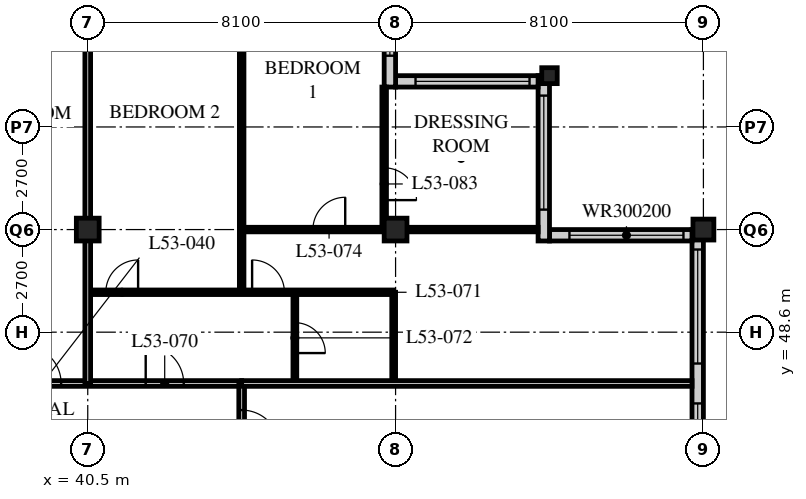
"""IFC4 building model, lengths in metres.
Left out: names, types, materials, properties, quantities, classifications, styles, units other than length and angle.
Written with IfcOpenShell. Run it as: python <this file> out.ifc"""

import sys

from ifc_helpers import new_model, si_unit, direction, frame, frame_2d, origin, origin_2d, place, context, subcontext, project, spatial, rectangle, hollow_rectangle, i_section, extrude, element, fill, save


model = new_model("IFC4")
c1 = context("Model", 3, precision=1e-05, world=origin(), true_north=direction((0.0, 1.0)))
c2 = subcontext(c1, "Body", "Model", "MODEL_VIEW")
j1 = project(units=[si_unit("LENGTHUNIT", "METRE"), si_unit("PLANEANGLEUNIT", "RADIAN")], contexts=[c1])
p1 = place(None, origin())
s1 = spatial("IfcSite", under=j1, at=p1, CompositionType="ELEMENT")
p2 = place(p1, origin())
s2 = spatial("IfcBuilding", under=s1, at=p2, CompositionType="ELEMENT")
p3 = place(p2, frame((0.0, 0.0, 206.4)))
s3 = spatial("IfcBuildingStorey", under=s2, at=p3, CompositionType="ELEMENT", Elevation=206.4)
for number, where, z_axis, x_axis in (
    (1, (40.5, 51.3, 0.0), (0.0, 0.0, 1.0), (1.0, 0.0, 0.0)),
    (2, (48.6, 51.3, 0.0), (0.0, 0.0, 1.0), (1.0, 0.0, 0.0)),
):
    element("IfcColumn", number, at=place(p3, frame(where, z_axis=z_axis, x_axis=x_axis)), inside=s3, PredefinedType="COLUMN", context=c2, shape_type="SweptSolid", body=[
        extrude(hollow_rectangle(XDim=0.6, YDim=0.6, WallThickness=0.05, at=origin_2d()), origin(), (0.0, 0.0, 1.0), 3.6),
    ])
p4 = place(p3, frame((52.65, 55.35, 0.0), z_axis=(0.0, 0.0, 1.0), x_axis=(1.0, 0.0, 0.0)))
e3 = element("IfcColumn", 3, at=p4, inside=s3, PredefinedType="COLUMN", context=c2, shape_type="SweptSolid", body=[
    extrude(i_section(OverallWidth=0.407, OverallDepth=0.419, WebThickness=0.031, FlangeThickness=0.049, FilletRadius=0.015, at=origin_2d()), origin(), (0.0, 0.0, 1.0), 3.6),
])
p5 = place(p3, frame((56.7, 51.3, 0.0), z_axis=(0.0, 0.0, 1.0), x_axis=(1.0, 0.0, 0.0)))
e4 = element("IfcColumn", 4, at=p5, inside=s3, PredefinedType="COLUMN", context=c2, shape_type="SweptSolid", body=[
    extrude(hollow_rectangle(XDim=0.55, YDim=0.55, WallThickness=0.045, at=origin_2d()), origin(), (0.0, 0.0, 1.0), 3.6),
])
p6 = place(p3, frame((56.55, 19.2, 0.0), z_axis=(0.0, 0.0, 1.0), x_axis=(0.0, 1.0, 0.0)))
e5 = element("IfcWall", 5, at=p6, inside=s3, PredefinedType="SOLIDWALL", context=c2, shape_type="SweptSolid", body=[
    extrude(rectangle(XDim=32.1, YDim=0.3, at=frame_2d((16.05, 0.0))), origin(), (0.0, 0.0, 1.0), 3.39),
])
p7 = place(p6, frame((0.225, 0.0, 0.6)))
e6 = element("IfcOpeningElement", 6, at=p7, cuts=e5, PredefinedType="OPENING", context=c2, shape_type="SweptSolid", body=[
    extrude(rectangle(XDim=3.0, YDim=2.4, at=frame_2d((1.5, 1.2))), frame((0.0, 0.16, 0.0), z_axis=(0.0, -1.0, 0.0), x_axis=(1.0, 0.0, 0.0)), (0.0, 0.0, 1.0), 0.32),
])
p8 = place(p6, frame((4.275, 0.0, 0.6)))
e7 = element("IfcOpeningElement", 7, at=p8, cuts=e5, PredefinedType="OPENING", context=c2, shape_type="SweptSolid", body=[
    extrude(rectangle(XDim=3.0, YDim=2.4, at=frame_2d((1.5, 1.2))), frame((0.0, 0.16, 0.0), z_axis=(0.0, -1.0, 0.0), x_axis=(1.0, 0.0, 0.0)), (0.0, 0.0, 1.0), 0.32),
])
p9 = place(p6, frame((8.325, 0.0, 0.6)))
e8 = element("IfcOpeningElement", 8, at=p9, cuts=e5, PredefinedType="OPENING", context=c2, shape_type="SweptSolid", body=[
    extrude(rectangle(XDim=3.0, YDim=2.4, at=frame_2d((1.5, 1.2))), frame((0.0, 0.16, 0.0), z_axis=(0.0, -1.0, 0.0), x_axis=(1.0, 0.0, 0.0)), (0.0, 0.0, 1.0), 0.32),
])
p10 = place(p6, frame((12.375, 0.0, 0.6)))
e9 = element("IfcOpeningElement", 9, at=p10, cuts=e5, PredefinedType="OPENING", context=c2, shape_type="SweptSolid", body=[
    extrude(rectangle(XDim=3.0, YDim=2.4, at=frame_2d((1.5, 1.2))), frame((0.0, 0.16, 0.0), z_axis=(0.0, -1.0, 0.0), x_axis=(1.0, 0.0, 0.0)), (0.0, 0.0, 1.0), 0.32),
])
p11 = place(p6, frame((16.425, 0.0, 0.6)))
e10 = element("IfcOpeningElement", 10, at=p11, cuts=e5, PredefinedType="OPENING", context=c2, shape_type="SweptSolid", body=[
    extrude(rectangle(XDim=3.0, YDim=2.4, at=frame_2d((1.5, 1.2))), frame((0.0, 0.16, 0.0), z_axis=(0.0, -1.0, 0.0), x_axis=(1.0, 0.0, 0.0)), (0.0, 0.0, 1.0), 0.32),
])
p12 = place(p6, frame((20.475, 0.0, 0.6)))
e11 = element("IfcOpeningElement", 11, at=p12, cuts=e5, PredefinedType="OPENING", context=c2, shape_type="SweptSolid", body=[
    extrude(rectangle(XDim=3.0, YDim=2.4, at=frame_2d((1.5, 1.2))), frame((0.0, 0.16, 0.0), z_axis=(0.0, -1.0, 0.0), x_axis=(1.0, 0.0, 0.0)), (0.0, 0.0, 1.0), 0.32),
])
p13 = place(p6, frame((24.525, 0.0, 0.6)))
e12 = element("IfcOpeningElement", 12, at=p13, cuts=e5, PredefinedType="OPENING", context=c2, shape_type="SweptSolid", body=[
    extrude(rectangle(XDim=3.0, YDim=2.4, at=frame_2d((1.5, 1.2))), frame((0.0, 0.16, 0.0), z_axis=(0.0, -1.0, 0.0), x_axis=(1.0, 0.0, 0.0)), (0.0, 0.0, 1.0), 0.32),
])
p14 = place(p6, frame((28.575, 0.0, 0.6)))
e13 = element("IfcOpeningElement", 13, at=p14, cuts=e5, PredefinedType="OPENING", context=c2, shape_type="SweptSolid", body=[
    extrude(rectangle(XDim=3.0, YDim=2.4, at=frame_2d((1.5, 1.2))), frame((0.0, 0.16, 0.0), z_axis=(0.0, -1.0, 0.0), x_axis=(1.0, 0.0, 0.0)), (0.0, 0.0, 1.0), 0.32),
])
p15 = place(p3, frame((56.4, 51.15, 0.0), z_axis=(0.0, 0.0, 1.0), x_axis=(-1.0, 0.0, 0.0)))
e14 = element("IfcWall", 14, at=p15, inside=s3, PredefinedType="SOLIDWALL", context=c2, shape_type="SweptSolid", body=[
    extrude(rectangle(XDim=3.75, YDim=0.3, at=frame_2d((1.875, 0.0))), origin(), (0.0, 0.0, 1.0), 3.39),
])
p16 = place(p15, frame((0.225, 0.0, 0.6)))
e15 = element("IfcOpeningElement", 15, at=p16, cuts=e14, PredefinedType="OPENING", context=c2, shape_type="SweptSolid", body=[
    extrude(rectangle(XDim=3.0, YDim=2.0, at=frame_2d((1.5, 1.0))), frame((0.0, 0.16, 0.0), z_axis=(0.0, -1.0, 0.0), x_axis=(1.0, 0.0, 0.0)), (0.0, 0.0, 1.0), 0.32),
])
p17 = place(p3, frame((52.5, 51.0, 0.0), z_axis=(0.0, 0.0, 1.0), x_axis=(0.0, 1.0, 0.0)))
e16 = element("IfcWall", 16, at=p17, inside=s3, PredefinedType="SOLIDWALL", context=c2, shape_type="SweptSolid", body=[
    extrude(rectangle(XDim=4.35, YDim=0.3, at=frame_2d((2.175, 0.0))), origin(), (0.0, 0.0, 1.0), 3.39),
])
p18 = place(p17, frame((0.825, 0.0, 0.6)))
e17 = element("IfcOpeningElement", 17, at=p18, cuts=e16, PredefinedType="OPENING", context=c2, shape_type="SweptSolid", body=[
    extrude(rectangle(XDim=3.0, YDim=2.0, at=frame_2d((1.5, 1.0))), frame((0.0, 0.16, 0.0), z_axis=(0.0, -1.0, 0.0), x_axis=(1.0, 0.0, 0.0)), (0.0, 0.0, 1.0), 0.32),
])
p19 = place(p3, frame((52.35, 55.2, 0.0), z_axis=(0.0, 0.0, 1.0), x_axis=(-1.0, 0.0, 0.0)))
e18 = element("IfcWall", 18, at=p19, inside=s3, PredefinedType="SOLIDWALL", context=c2, shape_type="SweptSolid", body=[
    extrude(rectangle(XDim=3.75, YDim=0.3, at=frame_2d((1.875, 0.0))), origin(), (0.0, 0.0, 1.0), 3.39),
])
p20 = place(p19, frame((0.225, 0.0, 0.6)))
e19 = element("IfcOpeningElement", 19, at=p20, cuts=e18, PredefinedType="OPENING", context=c2, shape_type="SweptSolid", body=[
    extrude(rectangle(XDim=3.0, YDim=2.0, at=frame_2d((1.5, 1.0))), frame((0.0, 0.16, 0.0), z_axis=(0.0, -1.0, 0.0), x_axis=(1.0, 0.0, 0.0)), (0.0, 0.0, 1.0), 0.32),
])
p21 = place(p3, frame((48.45, 55.05, 0.0), z_axis=(0.0, 0.0, 1.0), x_axis=(0.0, 1.0, 0.0)))
e20 = element("IfcWall", 20, at=p21, inside=s3, PredefinedType="SOLIDWALL", context=c2, shape_type="SweptSolid", body=[
    extrude(rectangle(XDim=4.35, YDim=0.3, at=frame_2d((2.175, 0.0))), origin(), (0.0, 0.0, 1.0), 3.39),
])
p22 = place(p21, frame((0.825, 0.0, 0.6)))
e21 = element("IfcOpeningElement", 21, at=p22, cuts=e20, PredefinedType="OPENING", context=c2, shape_type="SweptSolid", body=[
    extrude(rectangle(XDim=3.0, YDim=2.0, at=frame_2d((1.5, 1.0))), frame((0.0, 0.16, 0.0), z_axis=(0.0, -1.0, 0.0), x_axis=(1.0, 0.0, 0.0)), (0.0, 0.0, 1.0), 0.32),
])
p23 = place(p3, frame((8.1, 47.25, 0.0), z_axis=(0.0, 0.0, 1.0), x_axis=(1.0, 0.0, 0.0)))
e22 = element("IfcWall", 22, at=p23, inside=s3, PredefinedType="PARTITIONING", context=c2, shape_type="SweptSolid", body=[
    extrude(rectangle(XDim=36.45, YDim=0.15, at=frame_2d((18.225, 0.0))), origin(), (0.0, 0.0, 1.0), 3.39),
])
p24 = place(p23, frame((4.45, 0.0, 0.0)))
e23 = element("IfcOpeningElement", 23, at=p24, cuts=e22, PredefinedType="OPENING", context=c2, shape_type="SweptSolid", body=[
    extrude(rectangle(XDim=1.0, YDim=2.1, at=frame_2d((0.5, 1.05))), frame((0.0, 0.085, 0.0), z_axis=(0.0, -1.0, 0.0), x_axis=(1.0, 0.0, 0.0)), (0.0, 0.0, 1.0), 0.17),
])
p25 = place(p23, frame((12.55, 0.0, 0.0)))
e24 = element("IfcOpeningElement", 24, at=p25, cuts=e22, PredefinedType="OPENING", context=c2, shape_type="SweptSolid", body=[
    extrude(rectangle(XDim=1.0, YDim=2.1, at=frame_2d((0.5, 1.05))), frame((0.0, 0.085, 0.0), z_axis=(0.0, -1.0, 0.0), x_axis=(1.0, 0.0, 0.0)), (0.0, 0.0, 1.0), 0.17),
])
p26 = place(p23, frame((30.7, 0.0, 0.0)))
e25 = element("IfcOpeningElement", 25, at=p26, cuts=e22, PredefinedType="OPENING", context=c2, shape_type="SweptSolid", body=[
    extrude(rectangle(XDim=1.0, YDim=2.1, at=frame_2d((0.5, 1.05))), frame((0.0, 0.085, 0.0), z_axis=(0.0, -1.0, 0.0), x_axis=(1.0, 0.0, 0.0)), (0.0, 0.0, 1.0), 0.17),
])
p27 = place(p23, frame((33.925, 0.0, 0.0)))
e26 = element("IfcOpeningElement", 26, at=p27, cuts=e22, PredefinedType="OPENING", context=c2, shape_type="SweptSolid", body=[
    extrude(rectangle(XDim=1.0, YDim=2.1, at=frame_2d((0.5, 1.05))), frame((0.0, 0.085, 0.0), z_axis=(0.0, -1.0, 0.0), x_axis=(1.0, 0.0, 0.0)), (0.0, 0.0, 1.0), 0.17),
])
p28 = place(p23, frame((1.525, 0.0, 0.0)))
e27 = element("IfcOpeningElement", 27, at=p28, cuts=e22, PredefinedType="OPENING", context=c2, shape_type="SweptSolid", body=[
    extrude(rectangle(XDim=1.0, YDim=2.1, at=frame_2d((0.5, 1.05))), frame((0.0, 0.085, 0.0), z_axis=(0.0, -1.0, 0.0), x_axis=(1.0, 0.0, 0.0)), (0.0, 0.0, 1.0), 0.17),
])
p29 = place(p3, frame((44.55, 18.9, 0.0), z_axis=(0.0, 0.0, 1.0), x_axis=(0.0, 1.0, 0.0)))
e28 = element("IfcWall", 28, at=p29, inside=s3, PredefinedType="PARTITIONING", context=c2, shape_type="SweptSolid", body=[
    extrude(rectangle(XDim=28.35, YDim=0.15, at=frame_2d((14.175, 0.0))), origin(), (0.0, 0.0, 1.0), 3.39),
])
p30 = place(p29, frame((0.4, 0.0, 0.0)))
e29 = element("IfcOpeningElement", 29, at=p30, cuts=e28, PredefinedType="OPENING", context=c2, shape_type="SweptSolid", body=[
    extrude(rectangle(XDim=1.0, YDim=2.1, at=frame_2d((0.5, 1.05))), frame((0.0, 0.085, 0.0), z_axis=(0.0, -1.0, 0.0), x_axis=(1.0, 0.0, 0.0)), (0.0, 0.0, 1.0), 0.17),
])
p31 = place(p29, frame((12.55, 0.0, 0.0)))
e30 = element("IfcOpeningElement", 30, at=p31, cuts=e28, PredefinedType="OPENING", context=c2, shape_type="SweptSolid", body=[
    extrude(rectangle(XDim=1.0, YDim=2.1, at=frame_2d((0.5, 1.05))), frame((0.0, 0.085, 0.0), z_axis=(0.0, -1.0, 0.0), x_axis=(1.0, 0.0, 0.0)), (0.0, 0.0, 1.0), 0.17),
])
p32 = place(p29, frame((26.65, 0.0, 0.0)))
e31 = element("IfcOpeningElement", 31, at=p32, cuts=e28, PredefinedType="OPENING", context=c2, shape_type="SweptSolid", body=[
    extrude(rectangle(XDim=1.0, YDim=2.1, at=frame_2d((0.5, 1.05))), frame((0.0, 0.085, 0.0), z_axis=(0.0, -1.0, 0.0), x_axis=(1.0, 0.0, 0.0)), (0.0, 0.0, 1.0), 0.17),
])
p33 = place(p3, frame((40.5, 49.65, 0.0), z_axis=(0.0, 0.0, 1.0), x_axis=(1.0, 0.0, 0.0)))
e32 = element("IfcWall", 32, at=p33, inside=s3, PredefinedType="PARTITIONING", context=c2, shape_type="SweptSolid", body=[
    extrude(rectangle(XDim=8.05, YDim=0.12, at=frame_2d((4.025, 0.0))), origin(), (0.0, 0.0, 1.0), 3.39),
])
p34 = place(p33, frame((0.475, 0.0, 0.0)))
e33 = element("IfcOpeningElement", 33, at=p34, cuts=e32, PredefinedType="OPENING", context=c2, shape_type="SweptSolid", body=[
    extrude(rectangle(XDim=0.85, YDim=2.1, at=frame_2d((0.425, 1.05))), frame((0.0, 0.07, 0.0), z_axis=(0.0, -1.0, 0.0), x_axis=(1.0, 0.0, 0.0)), (0.0, 0.0, 1.0), 0.14),
])
p35 = place(p33, frame((4.325, 0.0, 0.0)))
e34 = element("IfcOpeningElement", 34, at=p35, cuts=e32, PredefinedType="OPENING", context=c2, shape_type="SweptSolid", body=[
    extrude(rectangle(XDim=0.85, YDim=2.1, at=frame_2d((0.425, 1.05))), frame((0.0, 0.07, 0.0), z_axis=(0.0, -1.0, 0.0), x_axis=(1.0, 0.0, 0.0)), (0.0, 0.0, 1.0), 0.14),
])
p36 = place(p3, frame((45.95, 47.25, 0.0), z_axis=(0.0, 0.0, 1.0), x_axis=(0.0, 1.0, 0.0)))
e35 = element("IfcWall", 35, at=p36, inside=s3, PredefinedType="PARTITIONING", context=c2, shape_type="SweptSolid", body=[
    extrude(rectangle(XDim=2.4, YDim=0.1, at=frame_2d((1.2, 0.0))), origin(), (0.0, 0.0, 1.0), 3.39),
])
p37 = place(p36, frame((0.8, 0.0, 0.0)))
e36 = element("IfcOpeningElement", 36, at=p37, cuts=e35, PredefinedType="OPENING", context=c2, shape_type="SweptSolid", body=[
    extrude(rectangle(XDim=0.8, YDim=2.1, at=frame_2d((0.4, 1.05))), frame((0.0, 0.06, 0.0), z_axis=(0.0, -1.0, 0.0), x_axis=(1.0, 0.0, 0.0)), (0.0, 0.0, 1.0), 0.12),
])
p38 = place(p3, frame((48.55, 47.25, 0.0), z_axis=(0.0, 0.0, 1.0), x_axis=(0.0, 1.0, 0.0)))
e37 = element("IfcWall", 37, at=p38, inside=s3, PredefinedType="PARTITIONING", context=c2, shape_type="SweptSolid", body=[
    extrude(rectangle(XDim=2.4, YDim=0.1, at=frame_2d((1.2, 0.0))), origin(), (0.0, 0.0, 1.0), 2.778),
])
p39 = place(p3, frame((44.55, 49.65, 0.0), z_axis=(0.0, 0.0, 1.0), x_axis=(0.0, 1.0, 0.0)))
e38 = element("IfcWall", 38, at=p39, inside=s3, PredefinedType="PARTITIONING", context=c2, shape_type="SweptSolid", body=[
    extrude(rectangle(XDim=9.45, YDim=0.12, at=frame_2d((4.725, 0.0))), origin(), (0.0, 0.0, 1.0), 3.39),
])
p40 = place(p3, frame((44.55, 51.3, 0.0), z_axis=(0.0, 0.0, 1.0), x_axis=(1.0, 0.0, 0.0)))
e39 = element("IfcWall", 39, at=p40, inside=s3, PredefinedType="PARTITIONING", context=c2, shape_type="SweptSolid", body=[
    extrude(rectangle(XDim=7.8, YDim=0.12, at=frame_2d((3.9, 0.0))), origin(), (0.0, 0.0, 1.0), 2.778),
])
p41 = place(p40, frame((1.875, 0.0, 0.0)))
e40 = element("IfcOpeningElement", 40, at=p41, cuts=e39, PredefinedType="OPENING", context=c2, shape_type="SweptSolid", body=[
    extrude(rectangle(XDim=0.85, YDim=2.1, at=frame_2d((0.425, 1.05))), frame((0.0, 0.07, 0.0), z_axis=(0.0, -1.0, 0.0), x_axis=(1.0, 0.0, 0.0)), (0.0, 0.0, 1.0), 0.14),
])
p42 = place(p3, frame((44.55, 47.25, 0.0), z_axis=(0.0, 0.0, 1.0), x_axis=(1.0, 0.0, 0.0)))
e41 = element("IfcWall", 41, at=p42, inside=s3, PredefinedType="PARTITIONING", context=c2, shape_type="SweptSolid", body=[
    extrude(rectangle(XDim=11.85, YDim=0.15, at=frame_2d((5.925, 0.0))), origin(), (0.0, 0.0, 1.0), 3.39),
])
p43 = place(p3, frame((40.5, 47.25, 0.0), z_axis=(0.0, 0.0, 1.0), x_axis=(0.0, 1.0, 0.0)))
e42 = element("IfcWall", 42, at=p43, inside=s3, PredefinedType="PARTITIONING", context=c2, shape_type="SweptSolid", body=[
    extrude(rectangle(XDim=11.85, YDim=0.15, at=frame_2d((5.925, 0.0))), origin(), (0.0, 0.0, 1.0), 2.778),
])
p44 = place(p3, frame((48.3, 51.3, 0.0), z_axis=(0.0, 0.0, 1.0), x_axis=(0.0, 1.0, 0.0)))
e43 = element("IfcWall", 43, at=p44, inside=s3, PredefinedType="PARTITIONING", context=c2, shape_type="SweptSolid", body=[
    extrude(rectangle(XDim=3.75, YDim=0.12, at=frame_2d((1.875, 0.0))), origin(), (0.0, 0.0, 1.0), 3.39),
])
p45 = place(p44, frame((0.775, 0.0, 0.0)))
e44 = element("IfcOpeningElement", 44, at=p45, cuts=e43, PredefinedType="OPENING", context=c2, shape_type="SweptSolid", body=[
    extrude(rectangle(XDim=0.85, YDim=2.1, at=frame_2d((0.425, 1.05))), frame((0.0, 0.07, 0.0), z_axis=(0.0, -1.0, 0.0), x_axis=(1.0, 0.0, 0.0)), (0.0, 0.0, 1.0), 0.14),
])
p46 = place(p13, origin())
e45 = element("IfcWindow", 45, at=p46, inside=s3, PartitioningType="SINGLE_PANEL", PredefinedType="WINDOW", context=c2, shape_type="SweptSolid", body=[
    extrude(rectangle(XDim=3.0, YDim=2.4, at=frame_2d((1.5, 1.2))), frame((0.0, 0.03, 0.0), z_axis=(0.0, -1.0, 0.0), x_axis=(1.0, 0.0, 0.0)), (0.0, 0.0, 1.0), 0.06),
])
fill(e12, e45)
p47 = place(p14, origin())
e46 = element("IfcWindow", 46, at=p47, inside=s3, PartitioningType="SINGLE_PANEL", PredefinedType="WINDOW", context=c2, shape_type="SweptSolid", body=[
    extrude(rectangle(XDim=3.0, YDim=2.4, at=frame_2d((1.5, 1.2))), frame((0.0, 0.03, 0.0), z_axis=(0.0, -1.0, 0.0), x_axis=(1.0, 0.0, 0.0)), (0.0, 0.0, 1.0), 0.06),
])
fill(e13, e46)
p48 = place(p16, origin())
e47 = element("IfcWindow", 47, at=p48, inside=s3, PartitioningType="SINGLE_PANEL", PredefinedType="WINDOW", context=c2, shape_type="SweptSolid", body=[
    extrude(rectangle(XDim=3.0, YDim=2.0, at=frame_2d((1.5, 1.0))), frame((0.0, 0.03, 0.0), z_axis=(0.0, -1.0, 0.0), x_axis=(1.0, 0.0, 0.0)), (0.0, 0.0, 1.0), 0.06),
])
fill(e15, e47)
p49 = place(p18, origin())
e48 = element("IfcWindow", 48, at=p49, inside=s3, PartitioningType="SINGLE_PANEL", PredefinedType="WINDOW", context=c2, shape_type="SweptSolid", body=[
    extrude(rectangle(XDim=3.0, YDim=2.0, at=frame_2d((1.5, 1.0))), frame((0.0, 0.03, 0.0), z_axis=(0.0, -1.0, 0.0), x_axis=(1.0, 0.0, 0.0)), (0.0, 0.0, 1.0), 0.06),
])
fill(e17, e48)
p50 = place(p20, origin())
e49 = element("IfcWindow", 49, at=p50, inside=s3, PartitioningType="SINGLE_PANEL", PredefinedType="WINDOW", context=c2, shape_type="SweptSolid", body=[
    extrude(rectangle(XDim=3.0, YDim=2.0, at=frame_2d((1.5, 1.0))), frame((0.0, 0.03, 0.0), z_axis=(0.0, -1.0, 0.0), x_axis=(1.0, 0.0, 0.0)), (0.0, 0.0, 1.0), 0.06),
])
fill(e19, e49)
p51 = place(p22, origin())
e50 = element("IfcWindow", 50, at=p51, inside=s3, PartitioningType="SINGLE_PANEL", PredefinedType="WINDOW", context=c2, shape_type="SweptSolid", body=[
    extrude(rectangle(XDim=3.0, YDim=2.0, at=frame_2d((1.5, 1.0))), frame((0.0, 0.03, 0.0), z_axis=(0.0, -1.0, 0.0), x_axis=(1.0, 0.0, 0.0)), (0.0, 0.0, 1.0), 0.06),
])
fill(e21, e50)
p52 = place(p26, origin())
e51 = element("IfcDoor", 51, at=p52, inside=s3, OperationType="SINGLE_SWING_LEFT", PredefinedType="DOOR", context=c2, shape_type="SweptSolid", body=[
    extrude(rectangle(XDim=1.0, YDim=2.1, at=frame_2d((0.5, 1.05))), frame((0.0, 0.025, 0.0), z_axis=(0.0, -1.0, 0.0), x_axis=(1.0, 0.0, 0.0)), (0.0, 0.0, 1.0), 0.05),
])
fill(e25, e51)
p53 = place(p32, origin())
e52 = element("IfcDoor", 52, at=p53, inside=s3, OperationType="SINGLE_SWING_RIGHT", PredefinedType="DOOR", context=c2, shape_type="SweptSolid", body=[
    extrude(rectangle(XDim=1.0, YDim=2.1, at=frame_2d((0.5, 1.05))), frame((0.0, 0.025, 0.0), z_axis=(0.0, -1.0, 0.0), x_axis=(1.0, 0.0, 0.0)), (0.0, 0.0, 1.0), 0.05),
])
fill(e31, e52)
p54 = place(p27, origin())
e53 = element("IfcDoor", 53, at=p54, inside=s3, OperationType="SINGLE_SWING_LEFT", PredefinedType="DOOR", context=c2, shape_type="SweptSolid", body=[
    extrude(rectangle(XDim=1.0, YDim=2.1, at=frame_2d((0.5, 1.05))), frame((0.0, 0.025, 0.0), z_axis=(0.0, -1.0, 0.0), x_axis=(1.0, 0.0, 0.0)), (0.0, 0.0, 1.0), 0.05),
])
fill(e26, e53)
p55 = place(p34, origin())
e54 = element("IfcDoor", 54, at=p55, inside=s3, OperationType="SINGLE_SWING_RIGHT", PredefinedType="DOOR", context=c2, shape_type="SweptSolid", body=[
    extrude(rectangle(XDim=0.85, YDim=2.1, at=frame_2d((0.425, 1.05))), frame((0.0, 0.025, 0.0), z_axis=(0.0, -1.0, 0.0), x_axis=(1.0, 0.0, 0.0)), (0.0, 0.0, 1.0), 0.05),
])
fill(e33, e54)
p56 = place(p37, origin())
e55 = element("IfcDoor", 55, at=p56, inside=s3, OperationType="SINGLE_SWING_RIGHT", PredefinedType="DOOR", context=c2, shape_type="SweptSolid", body=[
    extrude(rectangle(XDim=0.8, YDim=2.1, at=frame_2d((0.4, 1.05))), frame((0.0, 0.025, 0.0), z_axis=(0.0, -1.0, 0.0), x_axis=(1.0, 0.0, 0.0)), (0.0, 0.0, 1.0), 0.05),
])
fill(e36, e55)
p57 = place(p35, origin())
e56 = element("IfcDoor", 56, at=p57, inside=s3, OperationType="SINGLE_SWING_LEFT", PredefinedType="DOOR", context=c2, shape_type="SweptSolid", body=[
    extrude(rectangle(XDim=0.85, YDim=2.1, at=frame_2d((0.425, 1.05))), frame((0.0, 0.025, 0.0), z_axis=(0.0, -1.0, 0.0), x_axis=(1.0, 0.0, 0.0)), (0.0, 0.0, 1.0), 0.05),
])
fill(e34, e56)
p58 = place(p41, origin())
e57 = element("IfcDoor", 57, at=p58, inside=s3, OperationType="SINGLE_SWING_RIGHT", PredefinedType="DOOR", context=c2, shape_type="SweptSolid", body=[
    extrude(rectangle(XDim=0.85, YDim=2.1, at=frame_2d((0.425, 1.05))), frame((0.0, 0.025, 0.0), z_axis=(0.0, -1.0, 0.0), x_axis=(1.0, 0.0, 0.0)), (0.0, 0.0, 1.0), 0.05),
])
fill(e40, e57)
p59 = place(p45, origin())
e58 = element("IfcDoor", 58, at=p59, inside=s3, OperationType="SINGLE_SWING_RIGHT", PredefinedType="DOOR", context=c2, shape_type="SweptSolid", body=[
    extrude(rectangle(XDim=0.85, YDim=2.1, at=frame_2d((0.425, 1.05))), frame((0.0, 0.025, 0.0), z_axis=(0.0, -1.0, 0.0), x_axis=(1.0, 0.0, 0.0)), (0.0, 0.0, 1.0), 0.05),
])
fill(e44, e58)
save(model, sys.argv[1])
